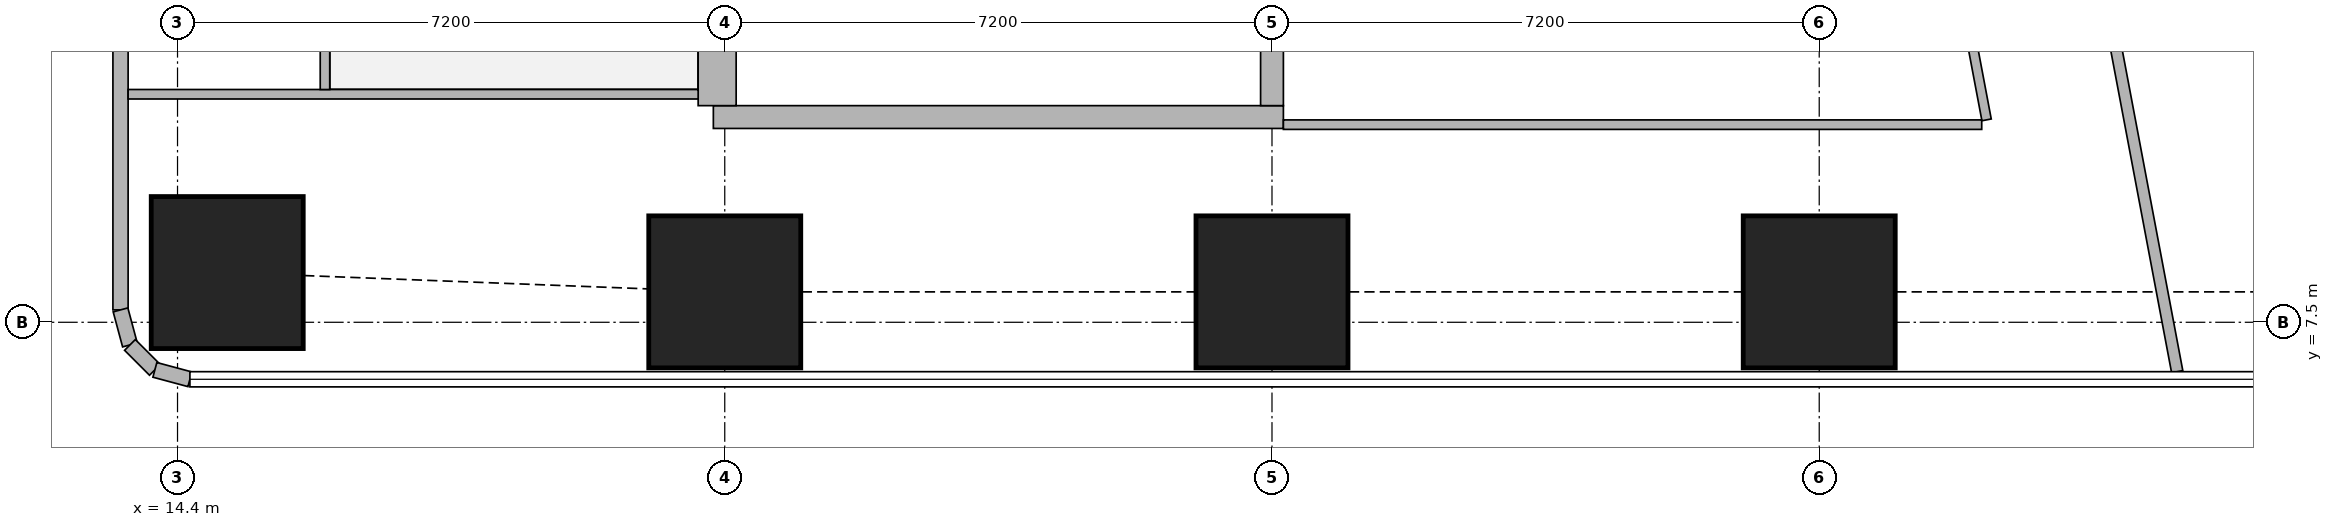
"""IFC4 building model, lengths in metres.
Left out: names, types, materials, properties, quantities, classifications, styles, units other than length and angle.
Written with IfcOpenShell. Run it as: python <this file> out.ifc"""

import sys

from ifc_helpers import new_model, si_unit, direction, frame, frame_2d, origin, origin_2d, place, context, subcontext, project, spatial, rectangle, extrude, element, fill, save


model = new_model("IFC4")
c1 = context("Model", 3, precision=1e-05, world=origin(), true_north=direction((0.0, 1.0)))
c2 = subcontext(c1, "Body", "Model", "MODEL_VIEW")
j1 = project(units=[si_unit("LENGTHUNIT", "METRE"), si_unit("PLANEANGLEUNIT", "RADIAN")], contexts=[c1])
p1 = place(None, origin())
s1 = spatial("IfcSite", under=j1, at=p1, CompositionType="ELEMENT")
p2 = place(p1, origin())
s2 = spatial("IfcBuilding", under=s1, at=p2, CompositionType="ELEMENT")
p3 = place(p2, frame((0.0, 0.0, 262.85)))
s3 = spatial("IfcBuildingStorey", under=s2, at=p3, CompositionType="ELEMENT", Elevation=262.85)
for number, where, z_axis, x_axis in (
    (1, (15.054, 8.154, 0.0), (0.0, 0.0, 1.0), (1.0, 0.0, 0.0)),
    (2, (21.6, 7.9, 0.0), (0.0, 0.0, 1.0), (1.0, 0.0, 0.0)),
    (3, (28.8, 7.9, 0.0), (0.0, 0.0, 1.0), (1.0, 0.0, 0.0)),
    (4, (36.0, 7.9, 0.0), (0.0, 0.0, 1.0), (1.0, 0.0, 0.0)),
):
    element("IfcColumn", number, at=place(p3, frame(where, z_axis=z_axis, x_axis=x_axis)), inside=s3, PredefinedType="COLUMN", context=c2, shape_type="SweptSolid", body=[
        extrude(rectangle(XDim=2.0, YDim=2.0, at=origin_2d()), origin(), (0.0, 0.0, 1.0), 3.75),
    ])
p4 = place(p3, frame((21.45, 10.2, 0.0), z_axis=(0.0, 0.0, 1.0), x_axis=(1.0, 0.0, 0.0)))
e5 = element("IfcWall", 5, at=p4, inside=s3, PredefinedType="SHEAR", context=c2, shape_type="SweptSolid", body=[
    extrude(rectangle(XDim=7.5, YDim=0.3, at=frame_2d((3.75, 0.0))), origin(), (0.0, 0.0, 1.0), 3.75),
])
p5 = place(p4, frame((1.2, 0.0, 0.0)))
e6 = element("IfcOpeningElement", 6, at=p5, cuts=e5, PredefinedType="OPENING", context=c2, shape_type="SweptSolid", body=[
    extrude(rectangle(XDim=1.1, YDim=2.1, at=frame_2d((0.55, 1.05))), frame((0.0, 0.16, 0.0), z_axis=(0.0, -1.0, 0.0), x_axis=(1.0, 0.0, 0.0)), (0.0, 0.0, 1.0), 0.32),
])
p6 = place(p3, frame((21.5, 10.35, 0.0), z_axis=(0.0, 0.0, 1.0), x_axis=(0.0, 1.0, 0.0)))
e7 = element("IfcWall", 7, at=p6, inside=s3, PredefinedType="SHEAR", context=c2, shape_type="SweptSolid", body=[
    extrude(rectangle(XDim=4.2, YDim=0.5, at=frame_2d((2.1, 0.0))), origin(), (0.0, 0.0, 1.0), 3.75),
])
p7 = place(p3, frame((28.8, 10.35, 0.0), z_axis=(0.0, 0.0, 1.0), x_axis=(0.0, 1.0, 0.0)))
e8 = element("IfcWall", 8, at=p7, inside=s3, PredefinedType="SHEAR", context=c2, shape_type="SweptSolid", body=[
    extrude(rectangle(XDim=4.2, YDim=0.3, at=frame_2d((2.1, 0.0))), origin(), (0.0, 0.0, 1.0), 3.75),
])
p8 = place(p3, frame((13.65, 43.037, 0.0), z_axis=(0.0, 0.0, 1.0), x_axis=(0.0, -1.0, 0.0)))
e9 = element("IfcWall", 9, at=p8, inside=s3, PredefinedType="SOLIDWALL", context=c2, shape_type="SweptSolid", body=[
    extrude(rectangle(XDim=35.374, YDim=0.2, at=frame_2d((17.687, 0.0))), origin(), (0.0, 0.0, 1.0), 3.5),
])
p9 = place(p8, frame((1.959, 0.0, 0.9)))
e10 = element("IfcOpeningElement", 10, at=p9, cuts=e9, PredefinedType="OPENING", context=c2, shape_type="SweptSolid", body=[
    extrude(rectangle(XDim=1.8, YDim=1.5, at=frame_2d((0.9, 0.75))), frame((0.0, 0.11, 0.0), z_axis=(0.0, -1.0, 0.0), x_axis=(1.0, 0.0, 0.0)), (0.0, 0.0, 1.0), 0.22),
])
p10 = place(p3, frame((13.65, 7.663, 0.0), z_axis=(0.0, 0.0, 1.0), x_axis=(0.259698463175, -0.965689757751, 0.0)))
e11 = element("IfcWall", 11, at=p10, inside=s3, PredefinedType="SOLIDWALL", context=c2, shape_type="SweptSolid", body=[
    extrude(rectangle(XDim=0.478, YDim=0.2, at=frame_2d((0.239, 0.0))), origin(), (0.0, 0.0, 1.0), 3.5),
])
p11 = place(p3, frame((13.774, 7.202, 0.0), z_axis=(0.0, 0.0, 1.0), x_axis=(0.707369890659, -0.706843573776, 0.0)))
e12 = element("IfcWall", 12, at=p11, inside=s3, PredefinedType="SOLIDWALL", context=c2, shape_type="SweptSolid", body=[
    extrude(rectangle(XDim=0.464, YDim=0.2, at=frame_2d((0.232, 0.0))), origin(), (0.0, 0.0, 1.0), 3.5),
])
p12 = place(p3, frame((14.102, 6.874, 0.0), z_axis=(0.0, 0.0, 1.0), x_axis=(0.965655254015, -0.259826731483, 0.0)))
e13 = element("IfcWall", 13, at=p12, inside=s3, PredefinedType="SOLIDWALL", context=c2, shape_type="SweptSolid", body=[
    extrude(rectangle(XDim=0.477, YDim=0.2, at=frame_2d((0.239, 0.0))), origin(), (0.0, 0.0, 1.0), 3.5),
])
p13 = place(p3, frame((34.036, 42.186, 0.0), z_axis=(0.0, 0.0, 1.0), x_axis=(0.185593518645, -0.9826266055, 0.0)))
e14 = element("IfcWall", 14, at=p13, inside=s3, PredefinedType="SOLIDWALL", context=c2, shape_type="SweptSolid", body=[
    extrude(rectangle(XDim=35.961, YDim=0.15, at=frame_2d((17.98, 0.0))), origin(), (0.0, 0.0, 1.0), 2.5),
])
p14 = place(p13, frame((15.529, 0.0, 0.0)))
e15 = element("IfcOpeningElement", 15, at=p14, cuts=e14, PredefinedType="OPENING", context=c2, shape_type="SweptSolid", body=[
    extrude(rectangle(XDim=1.0, YDim=2.1, at=frame_2d((0.5, 1.05))), frame((0.0, 0.085, 0.0), z_axis=(0.0, -1.0, 0.0), x_axis=(1.0, 0.0, 0.0)), (0.0, 0.0, 1.0), 0.17),
])
p15 = place(p13, frame((19.345, 0.0, 0.0)))
e16 = element("IfcOpeningElement", 16, at=p15, cuts=e14, PredefinedType="OPENING", context=c2, shape_type="SweptSolid", body=[
    extrude(rectangle(XDim=1.0, YDim=2.1, at=frame_2d((0.5, 1.05))), frame((0.0, 0.085, 0.0), z_axis=(0.0, -1.0, 0.0), x_axis=(1.0, 0.0, 0.0)), (0.0, 0.0, 1.0), 0.17),
])
p16 = place(p13, frame((30.594, 0.0, 0.0)))
e17 = element("IfcOpeningElement", 17, at=p16, cuts=e14, PredefinedType="OPENING", context=c2, shape_type="SweptSolid", body=[
    extrude(rectangle(XDim=1.0, YDim=2.1, at=frame_2d((0.5, 1.05))), frame((0.0, 0.085, 0.0), z_axis=(0.0, -1.0, 0.0), x_axis=(1.0, 0.0, 0.0)), (0.0, 0.0, 1.0), 0.17),
])
p17 = place(p3, frame((13.75, 10.5, 0.0), z_axis=(0.0, 0.0, 1.0), x_axis=(1.0, 0.0, 0.0)))
e18 = element("IfcWall", 18, at=p17, inside=s3, PredefinedType="PARTITIONING", context=c2, shape_type="SweptSolid", body=[
    extrude(rectangle(XDim=7.5, YDim=0.125, at=frame_2d((3.75, 0.0))), origin(), (0.0, 0.0, 1.0), 3.5),
])
p18 = place(p17, frame((4.245, 0.0, 0.0)))
e19 = element("IfcOpeningElement", 19, at=p18, cuts=e18, PredefinedType="OPENING", context=c2, shape_type="SweptSolid", body=[
    extrude(rectangle(XDim=1.8, YDim=2.1, at=frame_2d((0.9, 1.05))), frame((0.0, 0.073, 0.0), z_axis=(0.0, -1.0, 0.0), x_axis=(1.0, 0.0, 0.0)), (0.0, 0.0, 1.0), 0.145),
])
p19 = place(p3, frame((16.34, 10.562, 0.0), z_axis=(0.0, 0.0, 1.0), x_axis=(0.0, 1.0, 0.0)))
e20 = element("IfcWall", 20, at=p19, inside=s3, PredefinedType="PARTITIONING", context=c2, shape_type="SweptSolid", body=[
    extrude(rectangle(XDim=3.988, YDim=0.125, at=frame_2d((1.994, 0.0))), origin(), (0.0, 0.0, 1.0), 3.5),
])
p20 = place(p19, frame((1.438, 0.0, 0.0)))
e21 = element("IfcOpeningElement", 21, at=p20, cuts=e20, PredefinedType="OPENING", context=c2, shape_type="SweptSolid", body=[
    extrude(rectangle(XDim=1.0, YDim=2.1, at=frame_2d((0.5, 1.05))), frame((0.0, 0.073, 0.0), z_axis=(0.0, -1.0, 0.0), x_axis=(1.0, 0.0, 0.0)), (0.0, 0.0, 1.0), 0.145),
])
p21 = place(p3, frame((28.95, 10.1, 0.0), z_axis=(0.0, 0.0, 1.0), x_axis=(1.0, 0.0, 0.0)))
e22 = element("IfcWall", 22, at=p21, inside=s3, PredefinedType="PARTITIONING", context=c2, shape_type="SweptSolid", body=[
    extrude(rectangle(XDim=9.188, YDim=0.125, at=frame_2d((4.594, 0.0))), origin(), (0.0, 0.0, 1.0), 3.5),
])
p22 = place(p3, frame((38.202, 10.163, 0.0), z_axis=(0.0, 0.0, 1.0), x_axis=(-0.185610321132, 0.982623431783, 0.0)))
e23 = element("IfcWall", 23, at=p22, inside=s3, PredefinedType="PARTITIONING", context=c2, shape_type="SweptSolid", body=[
    extrude(rectangle(XDim=25.111, YDim=0.125, at=frame_2d((12.556, 0.0))), origin(), (0.0, 0.0, 1.0), 2.5),
])
p23 = place(p22, frame((0.708, 0.0, 0.0)))
e24 = element("IfcOpeningElement", 24, at=p23, cuts=e23, PredefinedType="OPENING", context=c2, shape_type="SweptSolid", body=[
    extrude(rectangle(XDim=1.0, YDim=2.1, at=frame_2d((0.5, 1.05))), frame((0.0, 0.073, 0.0), z_axis=(0.0, -1.0, 0.0), x_axis=(1.0, 0.0, 0.0)), (0.0, 0.0, 1.0), 0.145),
])
p24 = place(p22, frame((5.9, 0.0, 0.0)))
e25 = element("IfcOpeningElement", 25, at=p24, cuts=e23, PredefinedType="OPENING", context=c2, shape_type="SweptSolid", body=[
    extrude(rectangle(XDim=1.0, YDim=2.1, at=frame_2d((0.5, 1.05))), frame((0.0, 0.073, 0.0), z_axis=(0.0, -1.0, 0.0), x_axis=(1.0, 0.0, 0.0)), (0.0, 0.0, 1.0), 0.145),
])
p25 = place(p22, frame((13.378, 0.0, 0.0)))
e26 = element("IfcOpeningElement", 26, at=p25, cuts=e23, PredefinedType="OPENING", context=c2, shape_type="SweptSolid", body=[
    extrude(rectangle(XDim=1.0, YDim=2.1, at=frame_2d((0.5, 1.05))), frame((0.0, 0.073, 0.0), z_axis=(0.0, -1.0, 0.0), x_axis=(1.0, 0.0, 0.0)), (0.0, 0.0, 1.0), 0.145),
])
p26 = place(p22, frame((17.194, 0.0, 0.0)))
e27 = element("IfcOpeningElement", 27, at=p26, cuts=e23, PredefinedType="OPENING", context=c2, shape_type="SweptSolid", body=[
    extrude(rectangle(XDim=1.0, YDim=2.1, at=frame_2d((0.5, 1.05))), frame((0.0, 0.073, 0.0), z_axis=(0.0, -1.0, 0.0), x_axis=(1.0, 0.0, 0.0)), (0.0, 0.0, 1.0), 0.145),
])
p27 = place(p22, frame((21.15, 0.0, 0.0)))
e28 = element("IfcOpeningElement", 28, at=p27, cuts=e23, PredefinedType="OPENING", context=c2, shape_type="SweptSolid", body=[
    extrude(rectangle(XDim=1.0, YDim=2.1, at=frame_2d((0.5, 1.05))), frame((0.0, 0.073, 0.0), z_axis=(0.0, -1.0, 0.0), x_axis=(1.0, 0.0, 0.0)), (0.0, 0.0, 1.0), 0.145),
])
p28 = place(p18, origin())
e29 = element("IfcDoor", 29, at=p28, inside=s3, OperationType="DOUBLE_DOOR_SINGLE_SWING", PredefinedType="DOOR", context=c2, shape_type="SweptSolid", body=[
    extrude(rectangle(XDim=1.8, YDim=2.1, at=frame_2d((0.9, 1.05))), frame((0.0, 0.025, 0.0), z_axis=(0.0, -1.0, 0.0), x_axis=(1.0, 0.0, 0.0)), (0.0, 0.0, 1.0), 0.05),
])
fill(e19, e29)
p29 = place(p23, origin())
e30 = element("IfcDoor", 30, at=p29, inside=s3, OperationType="SINGLE_SWING_LEFT", PredefinedType="DOOR", context=c2, shape_type="SweptSolid", body=[
    extrude(rectangle(XDim=1.0, YDim=2.1, at=frame_2d((0.5, 1.05))), frame((0.0, 0.025, 0.0), z_axis=(0.0, -1.0, 0.0), x_axis=(1.0, 0.0, 0.0)), (0.0, 0.0, 1.0), 0.05),
])
fill(e24, e30)
p30 = place(p5, origin())
e31 = element("IfcDoor", 31, at=p30, inside=s3, OperationType="SINGLE_SWING_LEFT", PredefinedType="DOOR", context=c2, shape_type="SweptSolid", body=[
    extrude(rectangle(XDim=1.1, YDim=2.1, at=frame_2d((0.55, 1.05))), frame((0.0, 0.025, 0.0), z_axis=(0.0, -1.0, 0.0), x_axis=(1.0, 0.0, 0.0)), (0.0, 0.0, 1.0), 0.05),
])
fill(e6, e31)
save(model, sys.argv[1])
